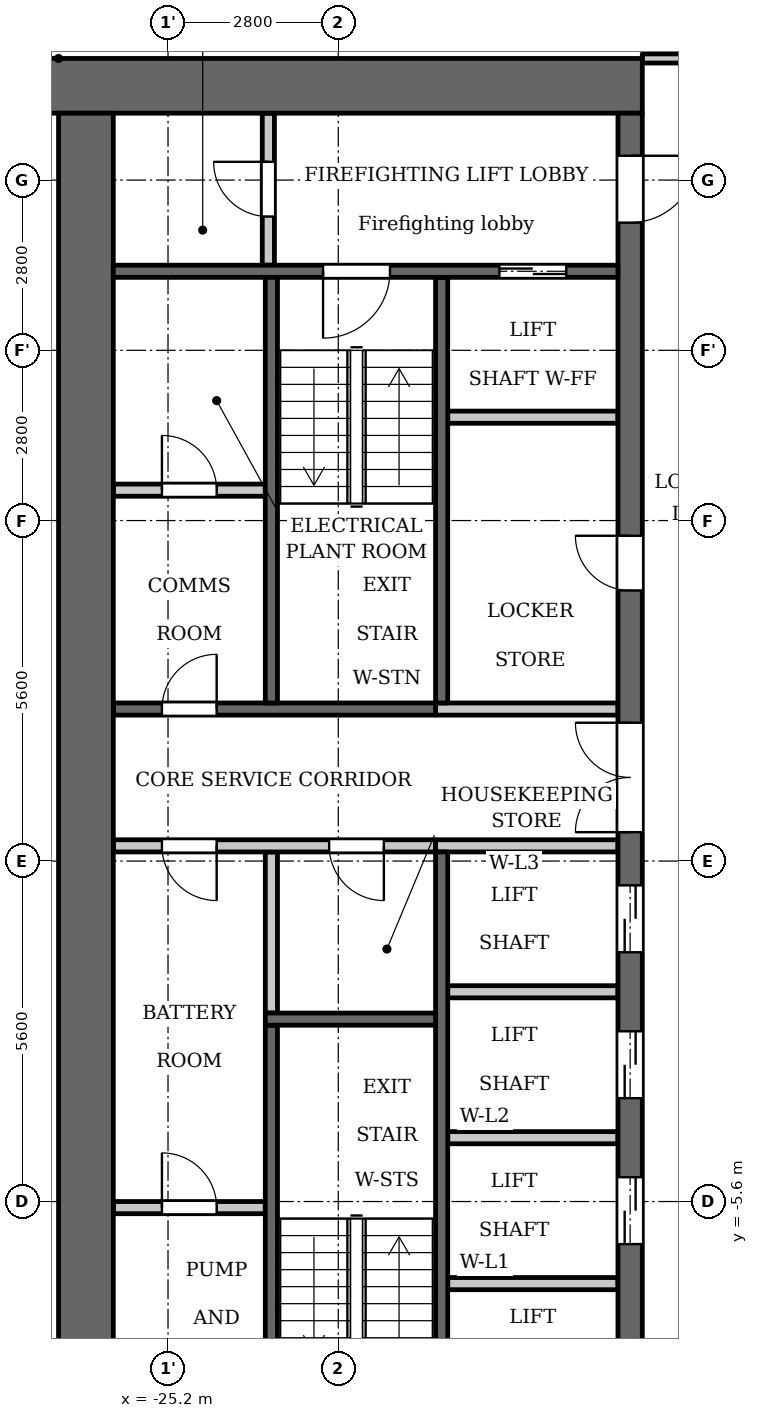
"""IFC4 building model, lengths in metres.
Left out: names, types, materials, properties, quantities, classifications, styles, units other than length and angle.
Written with IfcOpenShell. Run it as: python <this file> out.ifc"""

import sys

from ifc_helpers import new_model, si_unit, direction, frame, frame_2d, origin, place, context, subcontext, project, spatial, rectangle, extrude, element, fill, save


model = new_model("IFC4")
c1 = context("Model", 3, precision=1e-05, world=origin(), true_north=direction((0.0, 1.0)))
c2 = subcontext(c1, "Body", "Model", "MODEL_VIEW")
j1 = project(units=[si_unit("LENGTHUNIT", "METRE"), si_unit("PLANEANGLEUNIT", "RADIAN")], contexts=[c1])
p1 = place(None, origin())
s1 = spatial("IfcSite", under=j1, at=p1, CompositionType="ELEMENT")
p2 = place(p1, origin())
s2 = spatial("IfcBuilding", under=s1, at=p2, CompositionType="ELEMENT")
p3 = place(p2, frame((0.0, 0.0, 93.8)))
s3 = spatial("IfcBuildingStorey", under=s2, at=p3, CompositionType="ELEMENT", Elevation=93.8)
p4 = place(p3, frame((-23.5, -2.5, 0.0), z_axis=(0.0, 0.0, 1.0), x_axis=(0.0, 1.0, 0.0)))
e1 = element("IfcWall", 1, at=p4, inside=s3, PredefinedType="PARTITIONING", context=c2, shape_type="SweptSolid", body=[
    extrude(rectangle(XDim=2.65, YDim=0.2, at=frame_2d((1.325, 0.0))), origin(), (0.0, 0.0, 1.0), 3.2),
])
p5 = place(p3, frame((-20.7, 2.6, 0.0), z_axis=(0.0, 0.0, 1.0), x_axis=(0.0, 1.0, 0.0)))
e2 = element("IfcWall", 2, at=p5, inside=s3, PredefinedType="SHEAR", context=c2, shape_type="SweptSolid", body=[
    extrude(rectangle(XDim=7.0, YDim=0.2, at=frame_2d((3.5, 0.0))), origin(), (0.0, 0.0, 1.0), 3.2),
])
p6 = place(p3, frame((-20.7, -9.6, 0.0), z_axis=(0.0, 0.0, 1.0), x_axis=(0.0, 1.0, 0.0)))
e3 = element("IfcWall", 3, at=p6, inside=s3, PredefinedType="SHEAR", context=c2, shape_type="SweptSolid", body=[
    extrude(rectangle(XDim=9.75, YDim=0.2, at=frame_2d((4.875, 0.0))), origin(), (0.0, 0.0, 1.0), 3.2),
])
p7 = place(p3, frame((-20.8, 2.5, 0.0), z_axis=(0.0, 0.0, 1.0), x_axis=(-1.0, 0.0, 0.0)))
e4 = element("IfcWall", 4, at=p7, inside=s3, PredefinedType="SHEAR", context=c2, shape_type="SweptSolid", body=[
    extrude(rectangle(XDim=5.3, YDim=0.2, at=frame_2d((2.65, 0.0))), origin(), (0.0, 0.0, 1.0), 3.2),
])
p8 = place(p7, frame((3.6, 0.0, 0.0)))
e5 = element("IfcOpeningElement", 5, at=p8, cuts=e4, PredefinedType="OPENING", context=c2, shape_type="SweptSolid", body=[
    extrude(rectangle(XDim=0.9, YDim=2.1, at=frame_2d((0.45, 1.05))), frame((0.0, 0.11, 0.0), z_axis=(0.0, -1.0, 0.0), x_axis=(1.0, 0.0, 0.0)), (0.0, 0.0, 1.0), 0.22),
])
p9 = place(p3, frame((-20.8, 0.25, 0.0), z_axis=(0.0, 0.0, 1.0), x_axis=(-1.0, 0.0, 0.0)))
e6 = element("IfcWall", 6, at=p9, inside=s3, PredefinedType="PARTITIONING", context=c2, shape_type="SweptSolid", body=[
    extrude(rectangle(XDim=5.3, YDim=0.2, at=frame_2d((2.65, 0.0))), origin(), (0.0, 0.0, 1.0), 3.2),
])
p10 = place(p9, frame((0.85, 0.0, 0.0)))
e7 = element("IfcOpeningElement", 7, at=p10, cuts=e6, PredefinedType="OPENING", context=c2, shape_type="SweptSolid", body=[
    extrude(rectangle(XDim=0.9, YDim=2.1, at=frame_2d((0.45, 1.05))), frame((0.0, 0.11, 0.0), z_axis=(0.0, -1.0, 0.0), x_axis=(1.0, 0.0, 0.0)), (0.0, 0.0, 1.0), 0.22),
])
p11 = place(p9, frame((3.6, 0.0, 0.0)))
e8 = element("IfcOpeningElement", 8, at=p11, cuts=e6, PredefinedType="OPENING", context=c2, shape_type="SweptSolid", body=[
    extrude(rectangle(XDim=0.9, YDim=2.1, at=frame_2d((0.45, 1.05))), frame((0.0, 0.11, 0.0), z_axis=(0.0, -1.0, 0.0), x_axis=(1.0, 0.0, 0.0)), (0.0, 0.0, 1.0), 0.22),
])
p12 = place(p3, frame((-17.4, 12.75, 0.0), z_axis=(0.0, 0.0, 1.0), x_axis=(-1.0, 0.0, 0.0)))
e9 = element("IfcWall", 9, at=p12, inside=s3, PredefinedType="SHEAR", context=c2, shape_type="SweptSolid", body=[
    extrude(rectangle(XDim=10.4, YDim=0.9, at=frame_2d((5.2, 0.0))), origin(), (0.0, 0.0, 1.0), 3.2),
])
p13 = place(p3, frame((-17.6, -12.3, 0.0), z_axis=(0.0, 0.0, 1.0), x_axis=(0.0, 1.0, 0.0)))
e10 = element("IfcWall", 10, at=p13, inside=s3, PredefinedType="SHEAR", context=c2, shape_type="SweptSolid", body=[
    extrude(rectangle(XDim=24.6, YDim=0.4, at=frame_2d((12.3, 0.0))), origin(), (0.0, 0.0, 1.0), 3.2),
])
p14 = place(p13, frame((6.0, 0.0, 0.0)))
e11 = element("IfcOpeningElement", 11, at=p14, cuts=e10, PredefinedType="OPENING", context=c2, shape_type="SweptSolid", body=[
    extrude(rectangle(XDim=1.1, YDim=2.1, at=frame_2d((0.55, 1.05))), frame((0.0, 0.21, 0.0), z_axis=(0.0, -1.0, 0.0), x_axis=(1.0, 0.0, 0.0)), (0.0, 0.0, 1.0), 0.42),
])
p15 = place(p13, frame((8.4, 0.0, 0.0)))
e12 = element("IfcOpeningElement", 12, at=p15, cuts=e10, PredefinedType="OPENING", context=c2, shape_type="SweptSolid", body=[
    extrude(rectangle(XDim=1.1, YDim=2.1, at=frame_2d((0.55, 1.05))), frame((0.0, 0.21, 0.0), z_axis=(0.0, -1.0, 0.0), x_axis=(1.0, 0.0, 0.0)), (0.0, 0.0, 1.0), 0.42),
])
p16 = place(p13, frame((10.8, 0.0, 0.0)))
e13 = element("IfcOpeningElement", 13, at=p16, cuts=e10, PredefinedType="OPENING", context=c2, shape_type="SweptSolid", body=[
    extrude(rectangle(XDim=1.1, YDim=2.1, at=frame_2d((0.55, 1.05))), frame((0.0, 0.21, 0.0), z_axis=(0.0, -1.0, 0.0), x_axis=(1.0, 0.0, 0.0)), (0.0, 0.0, 1.0), 0.42),
])
p17 = place(p13, frame((16.75, 0.0, 0.0)))
e14 = element("IfcOpeningElement", 14, at=p17, cuts=e10, PredefinedType="OPENING", context=c2, shape_type="SweptSolid", body=[
    extrude(rectangle(XDim=0.9, YDim=2.1, at=frame_2d((0.45, 1.05))), frame((0.0, 0.21, 0.0), z_axis=(0.0, -1.0, 0.0), x_axis=(1.0, 0.0, 0.0)), (0.0, 0.0, 1.0), 0.42),
])
p18 = place(p13, frame((22.8, 0.0, 0.0)))
e15 = element("IfcOpeningElement", 15, at=p18, cuts=e10, PredefinedType="OPENING", context=c2, shape_type="SweptSolid", body=[
    extrude(rectangle(XDim=1.1, YDim=2.1, at=frame_2d((0.55, 1.05))), frame((0.0, 0.21, 0.0), z_axis=(0.0, -1.0, 0.0), x_axis=(1.0, 0.0, 0.0)), (0.0, 0.0, 1.0), 0.42),
])
p19 = place(p13, frame((0.7, 0.0, 0.0)))
e16 = element("IfcOpeningElement", 16, at=p19, cuts=e10, PredefinedType="OPENING", context=c2, shape_type="SweptSolid", body=[
    extrude(rectangle(XDim=1.1, YDim=2.1, at=frame_2d((0.55, 1.05))), frame((0.0, 0.21, 0.0), z_axis=(0.0, -1.0, 0.0), x_axis=(1.0, 0.0, 0.0)), (0.0, 0.0, 1.0), 0.42),
])
p20 = place(p13, frame((12.775, 0.0, 0.0)))
e17 = element("IfcOpeningElement", 17, at=p20, cuts=e10, PredefinedType="OPENING", context=c2, shape_type="SweptSolid", body=[
    extrude(rectangle(XDim=1.8, YDim=2.1, at=frame_2d((0.9, 1.05))), frame((0.0, 0.21, 0.0), z_axis=(0.0, -1.0, 0.0), x_axis=(1.0, 0.0, 0.0)), (0.0, 0.0, 1.0), 0.42),
])
p21 = place(p3, frame((-26.55, -12.3, 0.0), z_axis=(0.0, 0.0, 1.0), x_axis=(0.0, 1.0, 0.0)))
e18 = element("IfcWall", 18, at=p21, inside=s3, PredefinedType="SHEAR", context=c2, shape_type="SweptSolid", body=[
    extrude(rectangle(XDim=24.6, YDim=0.9, at=frame_2d((12.3, 0.0))), origin(), (0.0, 0.0, 1.0), 3.2),
])
p22 = place(p3, frame((-23.55, 9.8, 0.0), z_axis=(0.0, 0.0, 1.0), x_axis=(0.0, 1.0, 0.0)))
e19 = element("IfcWall", 19, at=p22, inside=s3, PredefinedType="PARTITIONING", context=c2, shape_type="SweptSolid", body=[
    extrude(rectangle(XDim=2.5, YDim=0.2, at=frame_2d((1.25, 0.0))), origin(), (0.0, 0.0, 1.0), 3.2),
])
p23 = place(p22, frame((0.8, 0.0, 0.0)))
e20 = element("IfcOpeningElement", 20, at=p23, cuts=e19, PredefinedType="OPENING", context=c2, shape_type="SweptSolid", body=[
    extrude(rectangle(XDim=0.9, YDim=2.1, at=frame_2d((0.45, 1.05))), frame((0.0, 0.11, 0.0), z_axis=(0.0, -1.0, 0.0), x_axis=(1.0, 0.0, 0.0)), (0.0, 0.0, 1.0), 0.22),
])
p24 = place(p3, frame((-23.6, -5.7, 0.0), z_axis=(0.0, 0.0, 1.0), x_axis=(-1.0, 0.0, 0.0)))
e21 = element("IfcWall", 21, at=p24, inside=s3, PredefinedType="PARTITIONING", context=c2, shape_type="SweptSolid", body=[
    extrude(rectangle(XDim=2.5, YDim=0.2, at=frame_2d((1.25, 0.0))), origin(), (0.0, 0.0, 1.0), 3.2),
])
p25 = place(p24, frame((0.8, 0.0, 0.0)))
e22 = element("IfcOpeningElement", 22, at=p25, cuts=e21, PredefinedType="OPENING", context=c2, shape_type="SweptSolid", body=[
    extrude(rectangle(XDim=0.9, YDim=2.1, at=frame_2d((0.45, 1.05))), frame((0.0, 0.11, 0.0), z_axis=(0.0, -1.0, 0.0), x_axis=(1.0, 0.0, 0.0)), (0.0, 0.0, 1.0), 0.22),
])
p26 = place(p3, frame((-23.6, 6.1, 0.0), z_axis=(0.0, 0.0, 1.0), x_axis=(-1.0, 0.0, 0.0)))
e23 = element("IfcWall", 23, at=p26, inside=s3, PredefinedType="PARTITIONING", context=c2, shape_type="SweptSolid", body=[
    extrude(rectangle(XDim=2.5, YDim=0.2, at=frame_2d((1.25, 0.0))), origin(), (0.0, 0.0, 1.0), 3.2),
])
p27 = place(p26, frame((0.8, 0.0, 0.0)))
e24 = element("IfcOpeningElement", 24, at=p27, cuts=e23, PredefinedType="OPENING", context=c2, shape_type="SweptSolid", body=[
    extrude(rectangle(XDim=0.9, YDim=2.1, at=frame_2d((0.45, 1.05))), frame((0.0, 0.11, 0.0), z_axis=(0.0, -1.0, 0.0), x_axis=(1.0, 0.0, 0.0)), (0.0, 0.0, 1.0), 0.22),
])
for number, where, z_axis, x_axis in (
    (25, (-17.8, -6.95, 0.0), (0.0, 0.0, 1.0), (-1.0, 0.0, 0.0)),
    (26, (-17.8, -4.55, 0.0), (0.0, 0.0, 1.0), (-1.0, 0.0, 0.0)),
    (27, (-17.8, -2.15, 0.0), (0.0, 0.0, 1.0), (-1.0, 0.0, 0.0)),
):
    element("IfcWall", number, at=place(p3, frame(where, z_axis=z_axis, x_axis=x_axis)), inside=s3, PredefinedType="PARTITIONING", context=c2, shape_type="SweptSolid", body=[
        extrude(rectangle(XDim=2.8, YDim=0.2, at=frame_2d((1.4, 0.0))), origin(), (0.0, 0.0, 1.0), 3.2),
    ])
for number, where, z_axis, x_axis in (
    (28, (-17.8, 0.25, 0.0), (0.0, 0.0, 1.0), (-1.0, 0.0, 0.0)),
    (29, (-17.8, 2.5, 0.0), (0.0, 0.0, 1.0), (-1.0, 0.0, 0.0)),
):
    element("IfcWall", number, at=place(p3, frame(where, z_axis=z_axis, x_axis=x_axis)), inside=s3, PredefinedType="PARTITIONING", context=c2, shape_type="SweptSolid", body=[
        extrude(rectangle(XDim=3.0, YDim=0.2, at=frame_2d((1.5, 0.0))), origin(), (0.0, 0.0, 1.0), 3.2),
    ])
p28 = place(p3, frame((-17.8, 7.3, 0.0), z_axis=(0.0, 0.0, 1.0), x_axis=(-1.0, 0.0, 0.0)))
e30 = element("IfcWall", 30, at=p28, inside=s3, PredefinedType="PARTITIONING", context=c2, shape_type="SweptSolid", body=[
    extrude(rectangle(XDim=2.8, YDim=0.2, at=frame_2d((1.4, 0.0))), origin(), (0.0, 0.0, 1.0), 3.2),
])
p29 = place(p3, frame((-17.8, 9.7, 0.0), z_axis=(0.0, 0.0, 1.0), x_axis=(-1.0, 0.0, 0.0)))
e31 = element("IfcWall", 31, at=p29, inside=s3, PredefinedType="SHEAR", context=c2, shape_type="SweptSolid", body=[
    extrude(rectangle(XDim=8.3, YDim=0.2, at=frame_2d((4.15, 0.0))), origin(), (0.0, 0.0, 1.0), 3.2),
])
p30 = place(p29, frame((0.85, 0.0, 0.0)))
e32 = element("IfcOpeningElement", 32, at=p30, cuts=e31, PredefinedType="OPENING", context=c2, shape_type="SweptSolid", body=[
    extrude(rectangle(XDim=1.1, YDim=2.1, at=frame_2d((0.55, 1.05))), frame((0.0, 0.11, 0.0), z_axis=(0.0, -1.0, 0.0), x_axis=(1.0, 0.0, 0.0)), (0.0, 0.0, 1.0), 0.22),
])
p31 = place(p29, frame((3.75, 0.0, 0.0)))
e33 = element("IfcOpeningElement", 33, at=p31, cuts=e31, PredefinedType="OPENING", context=c2, shape_type="SweptSolid", body=[
    extrude(rectangle(XDim=1.1, YDim=2.1, at=frame_2d((0.55, 1.05))), frame((0.0, 0.11, 0.0), z_axis=(0.0, -1.0, 0.0), x_axis=(1.0, 0.0, 0.0)), (0.0, 0.0, 1.0), 0.22),
])
p32 = place(p3, frame((-23.5, 2.6, 0.0), z_axis=(0.0, 0.0, 1.0), x_axis=(0.0, 1.0, 0.0)))
e34 = element("IfcWall", 34, at=p32, inside=s3, PredefinedType="SHEAR", context=c2, shape_type="SweptSolid", body=[
    extrude(rectangle(XDim=7.0, YDim=0.2, at=frame_2d((3.5, 0.0))), origin(), (0.0, 0.0, 1.0), 3.2),
])
p33 = place(p3, frame((-23.5, -9.6, 0.0), z_axis=(0.0, 0.0, 1.0), x_axis=(0.0, 1.0, 0.0)))
e35 = element("IfcWall", 35, at=p33, inside=s3, PredefinedType="SHEAR", context=c2, shape_type="SweptSolid", body=[
    extrude(rectangle(XDim=6.9, YDim=0.2, at=frame_2d((3.45, 0.0))), origin(), (0.0, 0.0, 1.0), 3.2),
])
p34 = place(p3, frame((-20.8, -2.6, 0.0), z_axis=(0.0, 0.0, 1.0), x_axis=(-1.0, 0.0, 0.0)))
e36 = element("IfcWall", 36, at=p34, inside=s3, PredefinedType="SHEAR", context=c2, shape_type="SweptSolid", body=[
    extrude(rectangle(XDim=2.8, YDim=0.2, at=frame_2d((1.4, 0.0))), origin(), (0.0, 0.0, 1.0), 3.2),
])
p35 = place(p3, frame((-17.4, 13.2, 0.0), z_axis=(0.0, 0.0, 1.0), x_axis=(1.0, 0.0, 0.0)))
e37 = element("IfcWall", 37, at=p35, inside=s3, PredefinedType="PARTITIONING", context=c2, shape_type="SweptSolid", body=[
    extrude(rectangle(XDim=34.8, YDim=0.15, at=frame_2d((17.4, 0.0))), origin(), (0.0, 0.0, 1.0), 3.2),
])
p36 = place(p35, frame((0.75, 0.0, 0.0)))
e38 = element("IfcOpeningElement", 38, at=p36, cuts=e37, PredefinedType="OPENING", context=c2, shape_type="SweptSolid", body=[
    extrude(rectangle(XDim=1.0, YDim=2.1, at=frame_2d((0.5, 1.05))), frame((0.0, 0.085, 0.0), z_axis=(0.0, -1.0, 0.0), x_axis=(1.0, 0.0, 0.0)), (0.0, 0.0, 1.0), 0.17),
])
p37 = place(p35, frame((33.15, 0.0, 0.0)))
e39 = element("IfcOpeningElement", 39, at=p37, cuts=e37, PredefinedType="OPENING", context=c2, shape_type="SweptSolid", body=[
    extrude(rectangle(XDim=1.0, YDim=2.1, at=frame_2d((0.5, 1.05))), frame((0.0, 0.085, 0.0), z_axis=(0.0, -1.0, 0.0), x_axis=(1.0, 0.0, 0.0)), (0.0, 0.0, 1.0), 0.17),
])
p38 = place(p35, frame((6.85, 0.0, 0.0)))
e40 = element("IfcOpeningElement", 40, at=p38, cuts=e37, PredefinedType="OPENING", context=c2, shape_type="SweptSolid", body=[
    extrude(rectangle(XDim=1.0, YDim=2.1, at=frame_2d((0.5, 1.05))), frame((0.0, 0.085, 0.0), z_axis=(0.0, -1.0, 0.0), x_axis=(1.0, 0.0, 0.0)), (0.0, 0.0, 1.0), 0.17),
])
p39 = place(p35, frame((15.45, 0.0, 0.0)))
e41 = element("IfcOpeningElement", 41, at=p39, cuts=e37, PredefinedType="OPENING", context=c2, shape_type="SweptSolid", body=[
    extrude(rectangle(XDim=1.0, YDim=2.1, at=frame_2d((0.5, 1.05))), frame((0.0, 0.085, 0.0), z_axis=(0.0, -1.0, 0.0), x_axis=(1.0, 0.0, 0.0)), (0.0, 0.0, 1.0), 0.17),
])
p40 = place(p35, frame((21.4, 0.0, 0.0)))
e42 = element("IfcOpeningElement", 42, at=p40, cuts=e37, PredefinedType="OPENING", context=c2, shape_type="SweptSolid", body=[
    extrude(rectangle(XDim=1.0, YDim=2.1, at=frame_2d((0.5, 1.05))), frame((0.0, 0.085, 0.0), z_axis=(0.0, -1.0, 0.0), x_axis=(1.0, 0.0, 0.0)), (0.0, 0.0, 1.0), 0.17),
])
p41 = place(p35, frame((23.65, 0.0, 0.0)))
e43 = element("IfcOpeningElement", 43, at=p41, cuts=e37, PredefinedType="OPENING", context=c2, shape_type="SweptSolid", body=[
    extrude(rectangle(XDim=1.0, YDim=2.1, at=frame_2d((0.5, 1.05))), frame((0.0, 0.085, 0.0), z_axis=(0.0, -1.0, 0.0), x_axis=(1.0, 0.0, 0.0)), (0.0, 0.0, 1.0), 0.17),
])
p42 = place(p14, origin())
e44 = element("IfcDoor", 44, at=p42, inside=s3, OperationType="DOUBLE_DOOR_SLIDING", PredefinedType="DOOR", context=c2, shape_type="SweptSolid", body=[
    extrude(rectangle(XDim=1.1, YDim=2.1, at=frame_2d((0.55, 1.05))), frame((0.0, 0.025, 0.0), z_axis=(0.0, -1.0, 0.0), x_axis=(1.0, 0.0, 0.0)), (0.0, 0.0, 1.0), 0.05),
])
fill(e11, e44)
p43 = place(p15, origin())
e45 = element("IfcDoor", 45, at=p43, inside=s3, OperationType="DOUBLE_DOOR_SLIDING", PredefinedType="DOOR", context=c2, shape_type="SweptSolid", body=[
    extrude(rectangle(XDim=1.1, YDim=2.1, at=frame_2d((0.55, 1.05))), frame((0.0, 0.025, 0.0), z_axis=(0.0, -1.0, 0.0), x_axis=(1.0, 0.0, 0.0)), (0.0, 0.0, 1.0), 0.05),
])
fill(e12, e45)
p44 = place(p16, origin())
e46 = element("IfcDoor", 46, at=p44, inside=s3, OperationType="DOUBLE_DOOR_SLIDING", PredefinedType="DOOR", context=c2, shape_type="SweptSolid", body=[
    extrude(rectangle(XDim=1.1, YDim=2.1, at=frame_2d((0.55, 1.05))), frame((0.0, 0.025, 0.0), z_axis=(0.0, -1.0, 0.0), x_axis=(1.0, 0.0, 0.0)), (0.0, 0.0, 1.0), 0.05),
])
fill(e13, e46)
p45 = place(p17, origin())
e47 = element("IfcDoor", 47, at=p45, inside=s3, OperationType="SINGLE_SWING_LEFT", PredefinedType="DOOR", context=c2, shape_type="SweptSolid", body=[
    extrude(rectangle(XDim=0.9, YDim=2.1, at=frame_2d((0.45, 1.05))), frame((0.0, 0.025, 0.0), z_axis=(0.0, -1.0, 0.0), x_axis=(1.0, 0.0, 0.0)), (0.0, 0.0, 1.0), 0.05),
])
fill(e14, e47)
p46 = place(p30, origin())
e48 = element("IfcDoor", 48, at=p46, inside=s3, OperationType="DOUBLE_DOOR_SLIDING", PredefinedType="DOOR", context=c2, shape_type="SweptSolid", body=[
    extrude(rectangle(XDim=1.1, YDim=2.1, at=frame_2d((0.55, 1.05))), frame((0.0, 0.025, 0.0), z_axis=(0.0, -1.0, 0.0), x_axis=(1.0, 0.0, 0.0)), (0.0, 0.0, 1.0), 0.05),
])
fill(e32, e48)
p47 = place(p18, origin())
e49 = element("IfcDoor", 49, at=p47, inside=s3, OperationType="SINGLE_SWING_RIGHT", PredefinedType="DOOR", context=c2, shape_type="SweptSolid", body=[
    extrude(rectangle(XDim=1.1, YDim=2.1, at=frame_2d((0.55, 1.05))), frame((0.0, 0.025, 0.0), z_axis=(0.0, -1.0, 0.0), x_axis=(1.0, 0.0, 0.0)), (0.0, 0.0, 1.0), 0.05),
])
fill(e15, e49)
p48 = place(p23, origin())
e50 = element("IfcDoor", 50, at=p48, inside=s3, OperationType="SINGLE_SWING_LEFT", PredefinedType="DOOR", context=c2, shape_type="SweptSolid", body=[
    extrude(rectangle(XDim=0.9, YDim=2.1, at=frame_2d((0.45, 1.05))), frame((0.0, 0.025, 0.0), z_axis=(0.0, -1.0, 0.0), x_axis=(1.0, 0.0, 0.0)), (0.0, 0.0, 1.0), 0.05),
])
fill(e20, e50)
p49 = place(p31, origin())
e51 = element("IfcDoor", 51, at=p49, inside=s3, OperationType="SINGLE_SWING_LEFT", PredefinedType="DOOR", context=c2, shape_type="SweptSolid", body=[
    extrude(rectangle(XDim=1.1, YDim=2.1, at=frame_2d((0.55, 1.05))), frame((0.0, 0.025, 0.0), z_axis=(0.0, -1.0, 0.0), x_axis=(1.0, 0.0, 0.0)), (0.0, 0.0, 1.0), 0.05),
])
fill(e33, e51)
p50 = place(p20, origin())
e52 = element("IfcDoor", 52, at=p50, inside=s3, OperationType="DOUBLE_DOOR_SINGLE_SWING", PredefinedType="DOOR", context=c2, shape_type="SweptSolid", body=[
    extrude(rectangle(XDim=1.8, YDim=2.1, at=frame_2d((0.9, 1.05))), frame((0.0, 0.025, 0.0), z_axis=(0.0, -1.0, 0.0), x_axis=(1.0, 0.0, 0.0)), (0.0, 0.0, 1.0), 0.05),
])
fill(e17, e52)
p51 = place(p10, origin())
e53 = element("IfcDoor", 53, at=p51, inside=s3, OperationType="SINGLE_SWING_RIGHT", PredefinedType="DOOR", context=c2, shape_type="SweptSolid", body=[
    extrude(rectangle(XDim=0.9, YDim=2.1, at=frame_2d((0.45, 1.05))), frame((0.0, 0.025, 0.0), z_axis=(0.0, -1.0, 0.0), x_axis=(1.0, 0.0, 0.0)), (0.0, 0.0, 1.0), 0.05),
])
fill(e7, e53)
p52 = place(p25, origin())
e54 = element("IfcDoor", 54, at=p52, inside=s3, OperationType="SINGLE_SWING_RIGHT", PredefinedType="DOOR", context=c2, shape_type="SweptSolid", body=[
    extrude(rectangle(XDim=0.9, YDim=2.1, at=frame_2d((0.45, 1.05))), frame((0.0, 0.025, 0.0), z_axis=(0.0, -1.0, 0.0), x_axis=(1.0, 0.0, 0.0)), (0.0, 0.0, 1.0), 0.05),
])
fill(e22, e54)
p53 = place(p11, origin())
e55 = element("IfcDoor", 55, at=p53, inside=s3, OperationType="SINGLE_SWING_RIGHT", PredefinedType="DOOR", context=c2, shape_type="SweptSolid", body=[
    extrude(rectangle(XDim=0.9, YDim=2.1, at=frame_2d((0.45, 1.05))), frame((0.0, 0.025, 0.0), z_axis=(0.0, -1.0, 0.0), x_axis=(1.0, 0.0, 0.0)), (0.0, 0.0, 1.0), 0.05),
])
fill(e8, e55)
p54 = place(p27, origin())
e56 = element("IfcDoor", 56, at=p54, inside=s3, OperationType="SINGLE_SWING_RIGHT", PredefinedType="DOOR", context=c2, shape_type="SweptSolid", body=[
    extrude(rectangle(XDim=0.9, YDim=2.1, at=frame_2d((0.45, 1.05))), frame((0.0, 0.025, 0.0), z_axis=(0.0, -1.0, 0.0), x_axis=(1.0, 0.0, 0.0)), (0.0, 0.0, 1.0), 0.05),
])
fill(e24, e56)
p55 = place(p8, origin())
e57 = element("IfcDoor", 57, at=p55, inside=s3, OperationType="SINGLE_SWING_LEFT", PredefinedType="DOOR", context=c2, shape_type="SweptSolid", body=[
    extrude(rectangle(XDim=0.9, YDim=2.1, at=frame_2d((0.45, 1.05))), frame((0.0, 0.025, 0.0), z_axis=(0.0, -1.0, 0.0), x_axis=(1.0, 0.0, 0.0)), (0.0, 0.0, 1.0), 0.05),
])
fill(e5, e57)
save(model, sys.argv[1])
